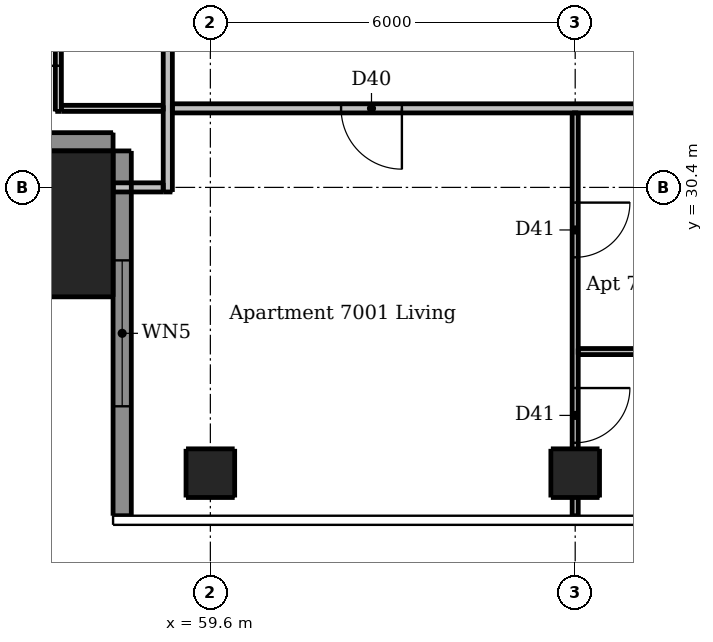
"""IFC4 building model, lengths in metres.
Left out: names, types, materials, properties, quantities, classifications, styles, units other than length and angle.
Written with IfcOpenShell. Run it as: python <this file> out.ifc"""

import sys

from ifc_helpers import new_model, si_unit, direction, frame, frame_2d, origin, origin_2d, place, context, subcontext, project, spatial, rectangle, extrude, element, fill, save


model = new_model("IFC4")
c1 = context("Model", 3, precision=1e-05, world=origin(), true_north=direction((0.0, 1.0)))
c2 = subcontext(c1, "Body", "Model", "MODEL_VIEW")
j1 = project(units=[si_unit("LENGTHUNIT", "METRE"), si_unit("PLANEANGLEUNIT", "RADIAN")], contexts=[c1])
p1 = place(None, origin())
s1 = spatial("IfcSite", under=j1, at=p1, CompositionType="ELEMENT")
p2 = place(p1, origin())
s2 = spatial("IfcBuilding", under=s1, at=p2, CompositionType="ELEMENT")
p3 = place(p2, frame((0.0, 0.0, 262.0)))
s3 = spatial("IfcBuildingStorey", under=s2, at=p3, CompositionType="ELEMENT", Elevation=262.0)
for number, where, z_axis, x_axis in (
    (1, (59.6, 25.7, 0.0), (0.0, 0.0, 1.0), (1.0, 0.0, 0.0)),
    (2, (65.6, 25.7, 0.0), (0.0, 0.0, 1.0), (1.0, 0.0, 0.0)),
):
    element("IfcColumn", number, at=place(p3, frame(where, z_axis=z_axis, x_axis=x_axis)), inside=s3, PredefinedType="COLUMN", context=c2, shape_type="SweptSolid", body=[
        extrude(rectangle(XDim=0.8, YDim=0.8, at=origin_2d()), origin(), (0.0, 0.0, 1.0), 3.05),
    ])
p4 = place(p3, frame((56.8, 29.8, 0.0), z_axis=(0.0, 0.0, 1.0), x_axis=(1.0, 0.0, 0.0)))
e3 = element("IfcColumn", 3, at=p4, inside=s3, PredefinedType="COLUMN", context=c2, shape_type="SweptSolid", body=[
    extrude(rectangle(XDim=2.4, YDim=2.4, at=origin_2d()), origin(), (0.0, 0.0, 1.0), 3.3),
])
p5 = place(p3, frame((53.0, 31.15, 0.0), z_axis=(0.0, 0.0, 1.0), x_axis=(1.0, 0.0, 0.0)))
e4 = element("IfcWall", 4, at=p5, inside=s3, PredefinedType="SOLIDWALL", context=c2, shape_type="SweptSolid", body=[
    extrude(rectangle(XDim=5.0, YDim=0.3, at=frame_2d((2.5, 0.0))), origin(), (0.0, 0.0, 1.0), 3.05),
])
p6 = place(p3, frame((58.15, 31.0, 0.0), z_axis=(0.0, 0.0, 1.0), x_axis=(0.0, -1.0, 0.0)))
e5 = element("IfcWall", 5, at=p6, inside=s3, PredefinedType="SOLIDWALL", context=c2, shape_type="SweptSolid", body=[
    extrude(rectangle(XDim=6.0, YDim=0.3, at=frame_2d((3.0, 0.0))), origin(), (0.0, 0.0, 1.0), 3.05),
])
p7 = place(p6, frame((1.8, 0.0, 0.15)))
e6 = element("IfcOpeningElement", 6, at=p7, cuts=e5, PredefinedType="OPENING", context=c2, shape_type="SweptSolid", body=[
    extrude(rectangle(XDim=2.4, YDim=2.1, at=frame_2d((1.2, 1.05))), frame((0.0, 0.16, 0.0), z_axis=(0.0, -1.0, 0.0), x_axis=(1.0, 0.0, 0.0)), (0.0, 0.0, 1.0), 0.32),
])
p8 = place(p3, frame((57.1, 31.65, 0.0), z_axis=(0.0, 0.0, 1.0), x_axis=(0.0, 1.0, 0.0)))
e7 = element("IfcWall", 7, at=p8, inside=s3, PredefinedType="PARTITIONING", context=c2, shape_type="SweptSolid", body=[
    extrude(rectangle(XDim=16.675, YDim=0.1, at=frame_2d((8.337, 0.0))), origin(), (0.0, 0.0, 1.0), 3.05),
])
p9 = place(p8, frame((6.1, 0.0, 0.0)))
e8 = element("IfcOpeningElement", 8, at=p9, cuts=e7, PredefinedType="OPENING", context=c2, shape_type="SweptSolid", body=[
    extrude(rectangle(XDim=0.9, YDim=2.1, at=frame_2d((0.45, 1.05))), frame((0.0, 0.06, 0.0), z_axis=(0.0, -1.0, 0.0), x_axis=(1.0, 0.0, 0.0)), (0.0, 0.0, 1.0), 0.12),
])
p10 = place(p8, frame((9.1, 0.0, 0.0)))
e9 = element("IfcOpeningElement", 9, at=p10, cuts=e7, PredefinedType="OPENING", context=c2, shape_type="SweptSolid", body=[
    extrude(rectangle(XDim=0.9, YDim=2.1, at=frame_2d((0.45, 1.05))), frame((0.0, 0.06, 0.0), z_axis=(0.0, -1.0, 0.0), x_axis=(1.0, 0.0, 0.0)), (0.0, 0.0, 1.0), 0.12),
])
p11 = place(p8, frame((0.75, 0.0, 0.0)))
e10 = element("IfcOpeningElement", 10, at=p11, cuts=e7, PredefinedType="OPENING", context=c2, shape_type="SweptSolid", body=[
    extrude(rectangle(XDim=0.9, YDim=2.1, at=frame_2d((0.45, 1.05))), frame((0.0, 0.06, 0.0), z_axis=(0.0, -1.0, 0.0), x_axis=(1.0, 0.0, 0.0)), (0.0, 0.0, 1.0), 0.12),
])
p12 = place(p8, frame((14.5, 0.0, 0.0)))
e11 = element("IfcOpeningElement", 11, at=p12, cuts=e7, PredefinedType="OPENING", context=c2, shape_type="SweptSolid", body=[
    extrude(rectangle(XDim=0.9, YDim=2.1, at=frame_2d((0.45, 1.05))), frame((0.0, 0.06, 0.0), z_axis=(0.0, -1.0, 0.0), x_axis=(1.0, 0.0, 0.0)), (0.0, 0.0, 1.0), 0.12),
])
p13 = place(p8, frame((3.15, 0.0, 0.0)))
e12 = element("IfcOpeningElement", 12, at=p13, cuts=e7, PredefinedType="OPENING", context=c2, shape_type="SweptSolid", body=[
    extrude(rectangle(XDim=0.8, YDim=2.1, at=frame_2d((0.4, 1.05))), frame((0.0, 0.06, 0.0), z_axis=(0.0, -1.0, 0.0), x_axis=(1.0, 0.0, 0.0)), (0.0, 0.0, 1.0), 0.12),
])
p14 = place(p8, frame((11.55, 0.0, 0.0)))
e13 = element("IfcOpeningElement", 13, at=p14, cuts=e7, PredefinedType="OPENING", context=c2, shape_type="SweptSolid", body=[
    extrude(rectangle(XDim=0.8, YDim=2.1, at=frame_2d((0.4, 1.05))), frame((0.0, 0.06, 0.0), z_axis=(0.0, -1.0, 0.0), x_axis=(1.0, 0.0, 0.0)), (0.0, 0.0, 1.0), 0.12),
])
p15 = place(p3, frame((65.6, 31.625, 0.0), z_axis=(0.0, 0.0, 1.0), x_axis=(0.0, -1.0, 0.0)))
e14 = element("IfcWall", 14, at=p15, inside=s3, PredefinedType="PARTITIONING", context=c2, shape_type="SweptSolid", body=[
    extrude(rectangle(XDim=6.625, YDim=0.1, at=frame_2d((3.312, 0.0))), origin(), (0.0, 0.0, 1.0), 2.59),
])
p16 = place(p15, frame((1.475, 0.0, 0.0)))
e15 = element("IfcOpeningElement", 15, at=p16, cuts=e14, PredefinedType="OPENING", context=c2, shape_type="SweptSolid", body=[
    extrude(rectangle(XDim=0.9, YDim=2.1, at=frame_2d((0.45, 1.05))), frame((0.0, 0.06, 0.0), z_axis=(0.0, -1.0, 0.0), x_axis=(1.0, 0.0, 0.0)), (0.0, 0.0, 1.0), 0.12),
])
p17 = place(p15, frame((4.525, 0.0, 0.0)))
e16 = element("IfcOpeningElement", 16, at=p17, cuts=e14, PredefinedType="OPENING", context=c2, shape_type="SweptSolid", body=[
    extrude(rectangle(XDim=0.9, YDim=2.1, at=frame_2d((0.45, 1.05))), frame((0.0, 0.06, 0.0), z_axis=(0.0, -1.0, 0.0), x_axis=(1.0, 0.0, 0.0)), (0.0, 0.0, 1.0), 0.12),
])
p18 = place(p3, frame((57.15, 31.7, 0.0), z_axis=(0.0, 0.0, 1.0), x_axis=(1.0, 0.0, 0.0)))
e17 = element("IfcWall", 17, at=p18, inside=s3, PredefinedType="PARTITIONING", context=c2, shape_type="SweptSolid", body=[
    extrude(rectangle(XDim=1.675, YDim=0.1, at=frame_2d((0.837, 0.0))), origin(), (0.0, 0.0, 1.0), 3.05),
])
p19 = place(p3, frame((65.65, 27.7, 0.0), z_axis=(0.0, 0.0, 1.0), x_axis=(1.0, 0.0, 0.0)))
e18 = element("IfcWall", 18, at=p19, inside=s3, PredefinedType="PARTITIONING", context=c2, shape_type="SweptSolid", body=[
    extrude(rectangle(XDim=5.875, YDim=0.1, at=frame_2d((2.938, 0.0))), origin(), (0.0, 0.0, 1.0), 3.05),
])
p20 = place(p19, frame((3.75, 0.0, 0.0)))
e19 = element("IfcOpeningElement", 19, at=p20, cuts=e18, PredefinedType="OPENING", context=c2, shape_type="SweptSolid", body=[
    extrude(rectangle(XDim=0.8, YDim=2.1, at=frame_2d((0.4, 1.05))), frame((0.0, 0.06, 0.0), z_axis=(0.0, -1.0, 0.0), x_axis=(1.0, 0.0, 0.0)), (0.0, 0.0, 1.0), 0.12),
])
p21 = place(p3, frame((58.9, 30.325, 0.0), z_axis=(0.0, 0.0, 1.0), x_axis=(0.0, 1.0, 0.0)))
e20 = element("IfcWall", 20, at=p21, inside=s3, PredefinedType="PARTITIONING", context=c2, shape_type="SweptSolid", body=[
    extrude(rectangle(XDim=30.85, YDim=0.15, at=frame_2d((15.425, 0.0))), origin(), (0.0, 0.0, 1.0), 3.05),
])
p22 = place(p21, frame((9.225, 0.0, 0.0)))
e21 = element("IfcOpeningElement", 21, at=p22, cuts=e20, PredefinedType="OPENING", context=c2, shape_type="SweptSolid", body=[
    extrude(rectangle(XDim=1.0, YDim=2.1, at=frame_2d((0.5, 1.05))), frame((0.0, 0.085, 0.0), z_axis=(0.0, -1.0, 0.0), x_axis=(1.0, 0.0, 0.0)), (0.0, 0.0, 1.0), 0.17),
])
p23 = place(p21, frame((26.925, 0.0, 0.0)))
e22 = element("IfcOpeningElement", 22, at=p23, cuts=e20, PredefinedType="OPENING", context=c2, shape_type="SweptSolid", body=[
    extrude(rectangle(XDim=1.0, YDim=2.1, at=frame_2d((0.5, 1.05))), frame((0.0, 0.085, 0.0), z_axis=(0.0, -1.0, 0.0), x_axis=(1.0, 0.0, 0.0)), (0.0, 0.0, 1.0), 0.17),
])
p24 = place(p3, frame((89.525, 31.7, 0.0), z_axis=(0.0, 0.0, 1.0), x_axis=(-1.0, 0.0, 0.0)))
e23 = element("IfcWall", 23, at=p24, inside=s3, PredefinedType="PARTITIONING", context=c2, shape_type="SweptSolid", body=[
    extrude(rectangle(XDim=30.55, YDim=0.15, at=frame_2d((15.275, 0.0))), origin(), (0.0, 0.0, 1.0), 3.05),
])
p25 = place(p24, frame((26.775, 0.0, 0.0)))
e24 = element("IfcOpeningElement", 24, at=p25, cuts=e23, PredefinedType="OPENING", context=c2, shape_type="SweptSolid", body=[
    extrude(rectangle(XDim=1.0, YDim=2.1, at=frame_2d((0.5, 1.05))), frame((0.0, 0.085, 0.0), z_axis=(0.0, -1.0, 0.0), x_axis=(1.0, 0.0, 0.0)), (0.0, 0.0, 1.0), 0.17),
])
p26 = place(p24, frame((9.625, 0.0, 0.0)))
e25 = element("IfcOpeningElement", 25, at=p26, cuts=e23, PredefinedType="OPENING", context=c2, shape_type="SweptSolid", body=[
    extrude(rectangle(XDim=1.0, YDim=2.1, at=frame_2d((0.5, 1.05))), frame((0.0, 0.085, 0.0), z_axis=(0.0, -1.0, 0.0), x_axis=(1.0, 0.0, 0.0)), (0.0, 0.0, 1.0), 0.17),
])
p27 = place(p24, frame((2.425, 0.0, 0.0)))
e26 = element("IfcOpeningElement", 26, at=p27, cuts=e23, PredefinedType="OPENING", context=c2, shape_type="SweptSolid", body=[
    extrude(rectangle(XDim=1.0, YDim=2.1, at=frame_2d((0.5, 1.05))), frame((0.0, 0.085, 0.0), z_axis=(0.0, -1.0, 0.0), x_axis=(1.0, 0.0, 0.0)), (0.0, 0.0, 1.0), 0.17),
])
p28 = place(p3, frame((58.0, 30.4, 0.0), z_axis=(0.0, 0.0, 1.0), x_axis=(1.0, 0.0, 0.0)))
e27 = element("IfcWall", 27, at=p28, inside=s3, PredefinedType="PARTITIONING", context=c2, shape_type="SweptSolid", body=[
    extrude(rectangle(XDim=0.825, YDim=0.15, at=frame_2d((0.413, 0.0))), origin(), (0.0, 0.0, 1.0), 3.05),
])
p29 = place(p7, origin())
e28 = element("IfcWindow", 28, at=p29, inside=s3, PartitioningType="DOUBLE_PANEL_VERTICAL", PredefinedType="WINDOW", context=c2, shape_type="SweptSolid", body=[
    extrude(rectangle(XDim=2.4, YDim=2.1, at=frame_2d((1.2, 1.05))), frame((0.0, 0.03, 0.0), z_axis=(0.0, -1.0, 0.0), x_axis=(1.0, 0.0, 0.0)), (0.0, 0.0, 1.0), 0.06),
])
fill(e6, e28)
p30 = place(p25, origin())
e29 = element("IfcDoor", 29, at=p30, inside=s3, OperationType="SINGLE_SWING_LEFT", PredefinedType="DOOR", context=c2, shape_type="SweptSolid", body=[
    extrude(rectangle(XDim=1.0, YDim=2.1, at=frame_2d((0.5, 1.05))), frame((0.0, 0.025, 0.0), z_axis=(0.0, -1.0, 0.0), x_axis=(1.0, 0.0, 0.0)), (0.0, 0.0, 1.0), 0.05),
])
fill(e24, e29)
p31 = place(p16, origin())
e30 = element("IfcDoor", 30, at=p31, inside=s3, OperationType="SINGLE_SWING_LEFT", PredefinedType="DOOR", context=c2, shape_type="SweptSolid", body=[
    extrude(rectangle(XDim=0.9, YDim=2.1, at=frame_2d((0.45, 1.05))), frame((0.0, 0.025, 0.0), z_axis=(0.0, -1.0, 0.0), x_axis=(1.0, 0.0, 0.0)), (0.0, 0.0, 1.0), 0.05),
])
fill(e15, e30)
p32 = place(p17, origin())
e31 = element("IfcDoor", 31, at=p32, inside=s3, OperationType="SINGLE_SWING_LEFT", PredefinedType="DOOR", context=c2, shape_type="SweptSolid", body=[
    extrude(rectangle(XDim=0.9, YDim=2.1, at=frame_2d((0.45, 1.05))), frame((0.0, 0.025, 0.0), z_axis=(0.0, -1.0, 0.0), x_axis=(1.0, 0.0, 0.0)), (0.0, 0.0, 1.0), 0.05),
])
fill(e16, e31)
p33 = place(p11, origin())
e32 = element("IfcDoor", 32, at=p33, inside=s3, OperationType="SINGLE_SWING_LEFT", PredefinedType="DOOR", context=c2, shape_type="SweptSolid", body=[
    extrude(rectangle(XDim=0.9, YDim=2.1, at=frame_2d((0.45, 1.05))), frame((0.0, 0.025, 0.0), z_axis=(0.0, -1.0, 0.0), x_axis=(1.0, 0.0, 0.0)), (0.0, 0.0, 1.0), 0.05),
])
fill(e10, e32)
save(model, sys.argv[1])
